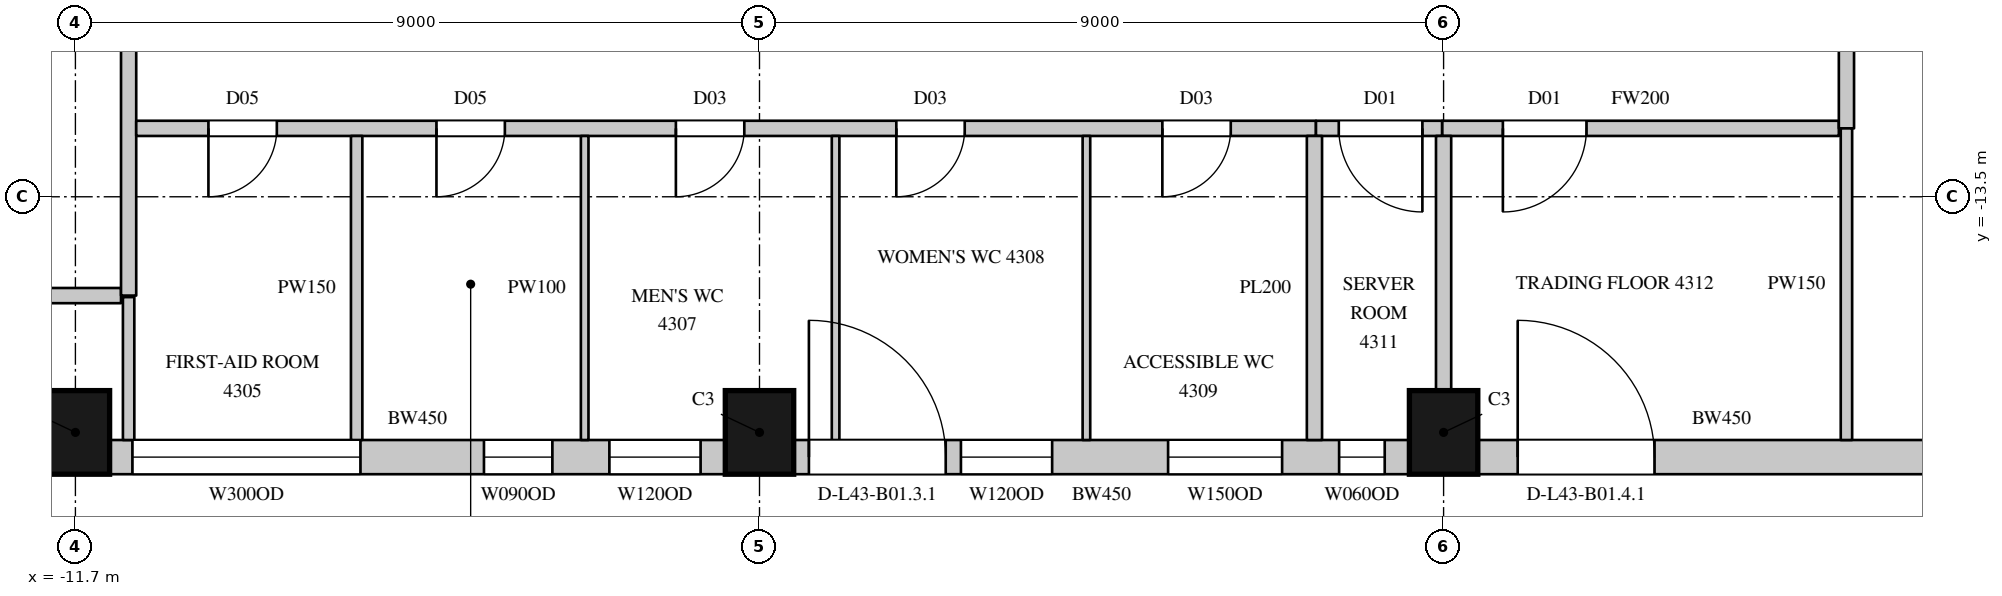
"""IFC4 building model, lengths in metres.
Left out: names, types, materials, properties, quantities, classifications, styles, units other than length and angle.
Written with IfcOpenShell. Run it as: python <this file> out.ifc"""

import sys

from ifc_helpers import new_model, si_unit, direction, frame, frame_2d, origin, origin_2d, place, context, subcontext, project, spatial, rectangle, extrude, element, fill, save


model = new_model("IFC4")
c1 = context("Model", 3, precision=1e-05, world=origin(), true_north=direction((0.0, 1.0)))
c2 = subcontext(c1, "Body", "Model", "MODEL_VIEW")
j1 = project(units=[si_unit("LENGTHUNIT", "METRE"), si_unit("PLANEANGLEUNIT", "RADIAN")], contexts=[c1])
p1 = place(None, origin())
s1 = spatial("IfcSite", under=j1, at=p1, CompositionType="ELEMENT")
p2 = place(p1, origin())
s2 = spatial("IfcBuilding", under=s1, at=p2, CompositionType="ELEMENT")
p3 = place(p2, frame((0.0, 0.0, 197.4)))
s3 = spatial("IfcBuildingStorey", under=s2, at=p3, CompositionType="ELEMENT", Elevation=197.4)
for number, where, z_axis, x_axis in (
    (1, (-11.7, -16.6, 0.0), (0.0, 0.0, 1.0), (1.0, 0.0, 0.0)),
    (2, (-2.7, -16.6, 0.0), (0.0, 0.0, 1.0), (1.0, 0.0, 0.0)),
    (3, (6.3, -16.6, 0.0), (0.0, 0.0, 1.0), (1.0, 0.0, 0.0)),
):
    element("IfcColumn", number, at=place(p3, frame(where, z_axis=z_axis, x_axis=x_axis)), inside=s3, PredefinedType="COLUMN", context=c2, shape_type="SweptSolid", body=[
        extrude(rectangle(XDim=0.9, YDim=1.1, at=origin_2d()), origin(), (0.0, 0.0, 1.0), 4.1),
    ])
p4 = place(p3, frame((-11.25, -16.925, 0.0), z_axis=(0.0, 0.0, 1.0), x_axis=(1.0, 0.0, 0.0)))
e4 = element("IfcWall", 4, at=p4, inside=s3, PredefinedType="SOLIDWALL", context=c2, shape_type="SweptSolid", body=[
    extrude(rectangle(XDim=8.1, YDim=0.45, at=frame_2d((4.05, 0.0))), origin(), (0.0, 0.0, 1.0), 3.8),
])
p5 = place(p4, frame((0.3, 0.0, 1.05)))
e5 = element("IfcOpeningElement", 5, at=p5, cuts=e4, PredefinedType="OPENING", context=c2, shape_type="SweptSolid", body=[
    extrude(rectangle(XDim=3.0, YDim=2.4, at=frame_2d((1.5, 1.2))), frame((0.0, 0.235, 0.0), z_axis=(0.0, -1.0, 0.0), x_axis=(1.0, 0.0, 0.0)), (0.0, 0.0, 1.0), 0.47),
])
p6 = place(p4, frame((4.925, 0.0, 1.05)))
e6 = element("IfcOpeningElement", 6, at=p6, cuts=e4, PredefinedType="OPENING", context=c2, shape_type="SweptSolid", body=[
    extrude(rectangle(XDim=0.9, YDim=2.4, at=frame_2d((0.45, 1.2))), frame((0.0, 0.235, 0.0), z_axis=(0.0, -1.0, 0.0), x_axis=(1.0, 0.0, 0.0)), (0.0, 0.0, 1.0), 0.47),
])
p7 = place(p4, frame((6.575, 0.0, 1.05)))
e7 = element("IfcOpeningElement", 7, at=p7, cuts=e4, PredefinedType="OPENING", context=c2, shape_type="SweptSolid", body=[
    extrude(rectangle(XDim=1.2, YDim=2.4, at=frame_2d((0.6, 1.2))), frame((0.0, 0.235, 0.0), z_axis=(0.0, -1.0, 0.0), x_axis=(1.0, 0.0, 0.0)), (0.0, 0.0, 1.0), 0.47),
])
p8 = place(p3, frame((-2.25, -16.925, 0.0), z_axis=(0.0, 0.0, 1.0), x_axis=(1.0, 0.0, 0.0)))
e8 = element("IfcWall", 8, at=p8, inside=s3, PredefinedType="SOLIDWALL", context=c2, shape_type="SweptSolid", body=[
    extrude(rectangle(XDim=8.1, YDim=0.45, at=frame_2d((4.05, 0.0))), origin(), (0.0, 0.0, 1.0), 3.8),
])
p9 = place(p8, frame((0.2, 0.0, 0.0)))
e9 = element("IfcOpeningElement", 9, at=p9, cuts=e8, PredefinedType="OPENING", context=c2, shape_type="SweptSolid", body=[
    extrude(rectangle(XDim=1.8, YDim=2.4, at=frame_2d((0.9, 1.2))), frame((0.0, 0.235, 0.0), z_axis=(0.0, -1.0, 0.0), x_axis=(1.0, 0.0, 0.0)), (0.0, 0.0, 1.0), 0.47),
])
p10 = place(p8, frame((2.2, 0.0, 1.05)))
e10 = element("IfcOpeningElement", 10, at=p10, cuts=e8, PredefinedType="OPENING", context=c2, shape_type="SweptSolid", body=[
    extrude(rectangle(XDim=1.2, YDim=2.4, at=frame_2d((0.6, 1.2))), frame((0.0, 0.235, 0.0), z_axis=(0.0, -1.0, 0.0), x_axis=(1.0, 0.0, 0.0)), (0.0, 0.0, 1.0), 0.47),
])
p11 = place(p8, frame((4.926, 0.0, 1.05)))
e11 = element("IfcOpeningElement", 11, at=p11, cuts=e8, PredefinedType="OPENING", context=c2, shape_type="SweptSolid", body=[
    extrude(rectangle(XDim=1.5, YDim=2.4, at=frame_2d((0.75, 1.2))), frame((0.0, 0.235, 0.0), z_axis=(0.0, -1.0, 0.0), x_axis=(1.0, 0.0, 0.0)), (0.0, 0.0, 1.0), 0.47),
])
p12 = place(p8, frame((7.176, 0.0, 1.05)))
e12 = element("IfcOpeningElement", 12, at=p12, cuts=e8, PredefinedType="OPENING", context=c2, shape_type="SweptSolid", body=[
    extrude(rectangle(XDim=0.6, YDim=2.4, at=frame_2d((0.3, 1.2))), frame((0.0, 0.235, 0.0), z_axis=(0.0, -1.0, 0.0), x_axis=(1.0, 0.0, 0.0)), (0.0, 0.0, 1.0), 0.47),
])
p13 = place(p3, frame((6.75, -16.925, 0.0), z_axis=(0.0, 0.0, 1.0), x_axis=(1.0, 0.0, 0.0)))
e13 = element("IfcWall", 13, at=p13, inside=s3, PredefinedType="SOLIDWALL", context=c2, shape_type="SweptSolid", body=[
    extrude(rectangle(XDim=6.414, YDim=0.45, at=frame_2d((3.207, 0.0))), origin(), (0.0, 0.0, 1.0), 3.8),
])
p14 = place(p13, frame((0.525, 0.0, 0.0)))
e14 = element("IfcOpeningElement", 14, at=p14, cuts=e13, PredefinedType="OPENING", context=c2, shape_type="SweptSolid", body=[
    extrude(rectangle(XDim=1.8, YDim=2.4, at=frame_2d((0.9, 1.2))), frame((0.0, 0.235, 0.0), z_axis=(0.0, -1.0, 0.0), x_axis=(1.0, 0.0, 0.0)), (0.0, 0.0, 1.0), 0.47),
])
p15 = place(p3, frame((-13.97, -14.8, 0.0), z_axis=(0.0, 0.0, 1.0), x_axis=(1.0, 0.0, 0.0)))
e15 = element("IfcWall", 15, at=p15, inside=s3, PredefinedType="PARTITIONING", context=c2, shape_type="SweptSolid", body=[
    extrude(rectangle(XDim=2.87, YDim=0.2, at=frame_2d((1.435, 0.0))), origin(), (0.0, 0.0, 1.0), 3.8),
])
p16 = place(p3, frame((-11.0, -14.8, 0.0), z_axis=(0.0, 0.0, 1.0), x_axis=(0.0, 1.0, 0.0)))
e16 = element("IfcWall", 16, at=p16, inside=s3, PredefinedType="PARTITIONING", context=c2, shape_type="SweptSolid", body=[
    extrude(rectangle(XDim=29.6, YDim=0.2, at=frame_2d((14.8, 0.0))), origin(), (0.0, 0.0, 1.0), 3.8),
])
p17 = place(p16, frame((14.05, 0.0, 0.0)))
e17 = element("IfcOpeningElement", 17, at=p17, cuts=e16, PredefinedType="OPENING", context=c2, shape_type="SweptSolid", body=[
    extrude(rectangle(XDim=1.5, YDim=2.4, at=frame_2d((0.75, 1.2))), frame((0.0, 0.11, 0.0), z_axis=(0.0, -1.0, 0.0), x_axis=(1.0, 0.0, 0.0)), (0.0, 0.0, 1.0), 0.22),
])
p18 = place(p3, frame((-10.9, -12.6, 0.0), z_axis=(0.0, 0.0, 1.0), x_axis=(1.0, 0.0, 0.0)))
e18 = element("IfcWall", 18, at=p18, inside=s3, PredefinedType="PARTITIONING", context=c2, shape_type="SweptSolid", body=[
    extrude(rectangle(XDim=15.521, YDim=0.2, at=frame_2d((7.76, 0.0))), origin(), (0.0, 0.0, 1.0), 3.8),
])
p19 = place(p18, frame((0.95, 0.0, 0.0)))
e19 = element("IfcOpeningElement", 19, at=p19, cuts=e18, PredefinedType="OPENING", context=c2, shape_type="SweptSolid", body=[
    extrude(rectangle(XDim=0.9, YDim=2.2, at=frame_2d((0.45, 1.1))), frame((0.0, 0.11, 0.0), z_axis=(0.0, -1.0, 0.0), x_axis=(1.0, 0.0, 0.0)), (0.0, 0.0, 1.0), 0.22),
])
p20 = place(p18, frame((3.95, 0.0, 0.0)))
e20 = element("IfcOpeningElement", 20, at=p20, cuts=e18, PredefinedType="OPENING", context=c2, shape_type="SweptSolid", body=[
    extrude(rectangle(XDim=0.9, YDim=2.2, at=frame_2d((0.45, 1.1))), frame((0.0, 0.11, 0.0), z_axis=(0.0, -1.0, 0.0), x_axis=(1.0, 0.0, 0.0)), (0.0, 0.0, 1.0), 0.22),
])
p21 = place(p18, frame((7.1, 0.0, 0.0)))
e21 = element("IfcOpeningElement", 21, at=p21, cuts=e18, PredefinedType="OPENING", context=c2, shape_type="SweptSolid", body=[
    extrude(rectangle(XDim=0.9, YDim=2.2, at=frame_2d((0.45, 1.1))), frame((0.0, 0.11, 0.0), z_axis=(0.0, -1.0, 0.0), x_axis=(1.0, 0.0, 0.0)), (0.0, 0.0, 1.0), 0.22),
])
p22 = place(p18, frame((10.0, 0.0, 0.0)))
e22 = element("IfcOpeningElement", 22, at=p22, cuts=e18, PredefinedType="OPENING", context=c2, shape_type="SweptSolid", body=[
    extrude(rectangle(XDim=0.9, YDim=2.2, at=frame_2d((0.45, 1.1))), frame((0.0, 0.11, 0.0), z_axis=(0.0, -1.0, 0.0), x_axis=(1.0, 0.0, 0.0)), (0.0, 0.0, 1.0), 0.22),
])
p23 = place(p18, frame((13.5, 0.0, 0.0)))
e23 = element("IfcOpeningElement", 23, at=p23, cuts=e18, PredefinedType="OPENING", context=c2, shape_type="SweptSolid", body=[
    extrude(rectangle(XDim=0.9, YDim=2.2, at=frame_2d((0.45, 1.1))), frame((0.0, 0.11, 0.0), z_axis=(0.0, -1.0, 0.0), x_axis=(1.0, 0.0, 0.0)), (0.0, 0.0, 1.0), 0.22),
])
p24 = place(p3, frame((6.28, -12.6, 0.0), z_axis=(0.0, 0.0, 1.0), x_axis=(1.0, 0.0, 0.0)))
e24 = element("IfcWall", 24, at=p24, inside=s3, PredefinedType="PARTITIONING", context=c2, shape_type="SweptSolid", body=[
    extrude(rectangle(XDim=5.22, YDim=0.2, at=frame_2d((2.61, 0.0))), origin(), (0.0, 0.0, 1.0), 3.8),
])
p25 = place(p24, frame((0.8, 0.0, 0.0)))
e25 = element("IfcOpeningElement", 25, at=p25, cuts=e24, PredefinedType="OPENING", context=c2, shape_type="SweptSolid", body=[
    extrude(rectangle(XDim=1.1, YDim=2.4, at=frame_2d((0.55, 1.2))), frame((0.0, 0.11, 0.0), z_axis=(0.0, -1.0, 0.0), x_axis=(1.0, 0.0, 0.0)), (0.0, 0.0, 1.0), 0.22),
])
p26 = place(p3, frame((11.6, -12.6, 0.0), z_axis=(0.0, 0.0, 1.0), x_axis=(0.0, 1.0, 0.0)))
e26 = element("IfcWall", 26, at=p26, inside=s3, PredefinedType="PARTITIONING", context=c2, shape_type="SweptSolid", body=[
    extrude(rectangle(XDim=25.1, YDim=0.2, at=frame_2d((12.55, 0.0))), origin(), (0.0, 0.0, 1.0), 3.8),
])
p27 = place(p26, frame((10.45, 0.0, 0.0)))
e27 = element("IfcOpeningElement", 27, at=p27, cuts=e26, PredefinedType="OPENING", context=c2, shape_type="SweptSolid", body=[
    extrude(rectangle(XDim=1.5, YDim=2.4, at=frame_2d((0.75, 1.2))), frame((0.0, 0.11, 0.0), z_axis=(0.0, -1.0, 0.0), x_axis=(1.0, 0.0, 0.0)), (0.0, 0.0, 1.0), 0.22),
])
p28 = place(p26, frame((3.45, 0.0, 0.0)))
e28 = element("IfcOpeningElement", 28, at=p28, cuts=e26, PredefinedType="OPENING", context=c2, shape_type="SweptSolid", body=[
    extrude(rectangle(XDim=1.1, YDim=2.4, at=frame_2d((0.55, 1.2))), frame((0.0, 0.11, 0.0), z_axis=(0.0, -1.0, 0.0), x_axis=(1.0, 0.0, 0.0)), (0.0, 0.0, 1.0), 0.22),
])
p29 = place(p3, frame((-11.0, -16.7, 0.0), z_axis=(0.0, 0.0, 1.0), x_axis=(0.0, 1.0, 0.0)))
e29 = element("IfcWall", 29, at=p29, inside=s3, PredefinedType="PARTITIONING", context=c2, shape_type="SweptSolid", body=[
    extrude(rectangle(XDim=1.88, YDim=0.15, at=frame_2d((0.94, 0.0))), origin(), (0.0, 0.0, 1.0), 3.8),
])
p30 = place(p3, frame((-8.0, -16.7, 0.0), z_axis=(0.0, 0.0, 1.0), x_axis=(0.0, 1.0, 0.0)))
e30 = element("IfcWall", 30, at=p30, inside=s3, PredefinedType="PARTITIONING", context=c2, shape_type="SweptSolid", body=[
    extrude(rectangle(XDim=4.0, YDim=0.15, at=frame_2d((2.0, 0.0))), origin(), (0.0, 0.0, 1.0), 3.8),
])
p31 = place(p3, frame((11.6, -16.7, 0.0), z_axis=(0.0, 0.0, 1.0), x_axis=(0.0, 1.0, 0.0)))
e31 = element("IfcWall", 31, at=p31, inside=s3, PredefinedType="PARTITIONING", context=c2, shape_type="SweptSolid", body=[
    extrude(rectangle(XDim=4.1, YDim=0.15, at=frame_2d((2.05, 0.0))), origin(), (0.0, 0.0, 1.0), 3.8),
])
p32 = place(p3, frame((4.621, -12.6, 0.0), z_axis=(0.0, 0.0, 1.0), x_axis=(1.0, 0.0, 0.0)))
e32 = element("IfcWall", 32, at=p32, inside=s3, PredefinedType="PARTITIONING", context=c2, shape_type="SweptSolid", body=[
    extrude(rectangle(XDim=1.659, YDim=0.2, at=frame_2d((0.83, 0.0))), origin(), (0.0, 0.0, 1.0), 3.8),
])
p33 = place(p32, frame((0.3, 0.0, 0.0)))
e33 = element("IfcOpeningElement", 33, at=p33, cuts=e32, PredefinedType="OPENING", context=c2, shape_type="SweptSolid", body=[
    extrude(rectangle(XDim=1.1, YDim=2.4, at=frame_2d((0.55, 1.2))), frame((0.0, 0.11, 0.0), z_axis=(0.0, -1.0, 0.0), x_axis=(1.0, 0.0, 0.0)), (0.0, 0.0, 1.0), 0.22),
])
p34 = place(p3, frame((4.601, -16.7, 0.0), z_axis=(0.0, 0.0, 1.0), x_axis=(0.0, 1.0, 0.0)))
e34 = element("IfcWall", 34, at=p34, inside=s3, PredefinedType="PARTITIONING", context=c2, shape_type="SweptSolid", body=[
    extrude(rectangle(XDim=4.0, YDim=0.2, at=frame_2d((2.0, 0.0))), origin(), (0.0, 0.0, 1.0), 3.8),
])
p35 = place(p3, frame((6.3, -16.05, 0.0), z_axis=(0.0, 0.0, 1.0), x_axis=(0.0, 1.0, 0.0)))
e35 = element("IfcWall", 35, at=p35, inside=s3, PredefinedType="PARTITIONING", context=c2, shape_type="SweptSolid", body=[
    extrude(rectangle(XDim=3.35, YDim=0.2, at=frame_2d((1.675, 0.0))), origin(), (0.0, 0.0, 1.0), 3.25),
])
for number, where, z_axis, x_axis in (
    (36, (-5.0, -16.7, 0.0), (0.0, 0.0, 1.0), (0.0, 1.0, 0.0)),
    (37, (-1.699, -16.7, 0.0), (0.0, 0.0, 1.0), (0.0, 1.0, 0.0)),
):
    element("IfcWall", number, at=place(p3, frame(where, z_axis=z_axis, x_axis=x_axis)), inside=s3, PredefinedType="PARTITIONING", context=c2, shape_type="SweptSolid", body=[
        extrude(rectangle(XDim=4.0, YDim=0.1, at=frame_2d((2.0, 0.0))), origin(), (0.0, 0.0, 1.0), 3.8),
    ])
p36 = place(p3, frame((1.601, -16.7, 0.0), z_axis=(0.0, 0.0, 1.0), x_axis=(0.0, 1.0, 0.0)))
e38 = element("IfcWall", 38, at=p36, inside=s3, PredefinedType="PARTITIONING", context=c2, shape_type="SweptSolid", body=[
    extrude(rectangle(XDim=4.0, YDim=0.1, at=frame_2d((2.0, 0.0))), origin(), (0.0, 0.0, 1.0), 3.15),
])
p37 = place(p5, origin())
e39 = element("IfcWindow", 39, at=p37, inside=s3, PartitioningType="SINGLE_PANEL", PredefinedType="WINDOW", context=c2, shape_type="SweptSolid", body=[
    extrude(rectangle(XDim=3.0, YDim=2.4, at=frame_2d((1.5, 1.2))), frame((0.0, 0.135, 0.0), z_axis=(0.0, -1.0, 0.0), x_axis=(1.0, 0.0, 0.0)), (0.0, 0.0, 1.0), 0.06),
])
fill(e5, e39)
p38 = place(p9, origin())
e40 = element("IfcDoor", 40, at=p38, inside=s3, OperationType="SLIDING_TO_LEFT", PredefinedType="DOOR", context=c2, shape_type="SweptSolid", body=[
    extrude(rectangle(XDim=1.8, YDim=2.4, at=frame_2d((0.9, 1.2))), frame((0.0, 0.13, 0.0), z_axis=(0.0, -1.0, 0.0), x_axis=(1.0, 0.0, 0.0)), (0.0, 0.0, 1.0), 0.05),
])
fill(e9, e40)
p39 = place(p10, origin())
e41 = element("IfcWindow", 41, at=p39, inside=s3, PartitioningType="SINGLE_PANEL", PredefinedType="WINDOW", context=c2, shape_type="SweptSolid", body=[
    extrude(rectangle(XDim=1.2, YDim=2.4, at=frame_2d((0.6, 1.2))), frame((0.0, 0.135, 0.0), z_axis=(0.0, -1.0, 0.0), x_axis=(1.0, 0.0, 0.0)), (0.0, 0.0, 1.0), 0.06),
])
fill(e10, e41)
p40 = place(p14, origin())
e42 = element("IfcDoor", 42, at=p40, inside=s3, OperationType="SLIDING_TO_LEFT", PredefinedType="DOOR", context=c2, shape_type="SweptSolid", body=[
    extrude(rectangle(XDim=1.8, YDim=2.4, at=frame_2d((0.9, 1.2))), frame((0.0, 0.13, 0.0), z_axis=(0.0, -1.0, 0.0), x_axis=(1.0, 0.0, 0.0)), (0.0, 0.0, 1.0), 0.05),
])
fill(e14, e42)
p41 = place(p19, origin())
e43 = element("IfcDoor", 43, at=p41, inside=s3, OperationType="SINGLE_SWING_RIGHT", PredefinedType="DOOR", context=c2, shape_type="SweptSolid", body=[
    extrude(rectangle(XDim=0.9, YDim=2.2, at=frame_2d((0.45, 1.1))), frame((0.0, 0.025, 0.0), z_axis=(0.0, -1.0, 0.0), x_axis=(1.0, 0.0, 0.0)), (0.0, 0.0, 1.0), 0.05),
])
fill(e19, e43)
p42 = place(p20, origin())
e44 = element("IfcDoor", 44, at=p42, inside=s3, OperationType="SINGLE_SWING_RIGHT", PredefinedType="DOOR", context=c2, shape_type="SweptSolid", body=[
    extrude(rectangle(XDim=0.9, YDim=2.2, at=frame_2d((0.45, 1.1))), frame((0.0, 0.025, 0.0), z_axis=(0.0, -1.0, 0.0), x_axis=(1.0, 0.0, 0.0)), (0.0, 0.0, 1.0), 0.05),
])
fill(e20, e44)
p43 = place(p21, origin())
e45 = element("IfcDoor", 45, at=p43, inside=s3, OperationType="SINGLE_SWING_RIGHT", PredefinedType="DOOR", context=c2, shape_type="SweptSolid", body=[
    extrude(rectangle(XDim=0.9, YDim=2.2, at=frame_2d((0.45, 1.1))), frame((0.0, 0.025, 0.0), z_axis=(0.0, -1.0, 0.0), x_axis=(1.0, 0.0, 0.0)), (0.0, 0.0, 1.0), 0.05),
])
fill(e21, e45)
p44 = place(p22, origin())
e46 = element("IfcDoor", 46, at=p44, inside=s3, OperationType="SINGLE_SWING_RIGHT", PredefinedType="DOOR", context=c2, shape_type="SweptSolid", body=[
    extrude(rectangle(XDim=0.9, YDim=2.2, at=frame_2d((0.45, 1.1))), frame((0.0, 0.025, 0.0), z_axis=(0.0, -1.0, 0.0), x_axis=(1.0, 0.0, 0.0)), (0.0, 0.0, 1.0), 0.05),
])
fill(e22, e46)
p45 = place(p23, origin())
e47 = element("IfcDoor", 47, at=p45, inside=s3, OperationType="SINGLE_SWING_RIGHT", PredefinedType="DOOR", context=c2, shape_type="SweptSolid", body=[
    extrude(rectangle(XDim=0.9, YDim=2.2, at=frame_2d((0.45, 1.1))), frame((0.0, 0.025, 0.0), z_axis=(0.0, -1.0, 0.0), x_axis=(1.0, 0.0, 0.0)), (0.0, 0.0, 1.0), 0.05),
])
fill(e23, e47)
p46 = place(p33, origin())
e48 = element("IfcDoor", 48, at=p46, inside=s3, OperationType="SINGLE_SWING_LEFT", PredefinedType="DOOR", context=c2, shape_type="SweptSolid", body=[
    extrude(rectangle(XDim=1.1, YDim=2.4, at=frame_2d((0.55, 1.2))), frame((0.0, 0.025, 0.0), z_axis=(0.0, -1.0, 0.0), x_axis=(1.0, 0.0, 0.0)), (0.0, 0.0, 1.0), 0.05),
])
fill(e33, e48)
p47 = place(p25, origin())
e49 = element("IfcDoor", 49, at=p47, inside=s3, OperationType="SINGLE_SWING_RIGHT", PredefinedType="DOOR", context=c2, shape_type="SweptSolid", body=[
    extrude(rectangle(XDim=1.1, YDim=2.4, at=frame_2d((0.55, 1.2))), frame((0.0, 0.025, 0.0), z_axis=(0.0, -1.0, 0.0), x_axis=(1.0, 0.0, 0.0)), (0.0, 0.0, 1.0), 0.05),
])
fill(e25, e49)
p48 = place(p6, origin())
e50 = element("IfcWindow", 50, at=p48, inside=s3, PartitioningType="SINGLE_PANEL", PredefinedType="WINDOW", context=c2, shape_type="SweptSolid", body=[
    extrude(rectangle(XDim=0.9, YDim=2.4, at=frame_2d((0.45, 1.2))), frame((0.0, 0.135, 0.0), z_axis=(0.0, -1.0, 0.0), x_axis=(1.0, 0.0, 0.0)), (0.0, 0.0, 1.0), 0.06),
])
fill(e6, e50)
p49 = place(p7, origin())
e51 = element("IfcWindow", 51, at=p49, inside=s3, PartitioningType="SINGLE_PANEL", PredefinedType="WINDOW", context=c2, shape_type="SweptSolid", body=[
    extrude(rectangle(XDim=1.2, YDim=2.4, at=frame_2d((0.6, 1.2))), frame((0.0, 0.135, 0.0), z_axis=(0.0, -1.0, 0.0), x_axis=(1.0, 0.0, 0.0)), (0.0, 0.0, 1.0), 0.06),
])
fill(e7, e51)
p50 = place(p11, origin())
e52 = element("IfcWindow", 52, at=p50, inside=s3, PartitioningType="SINGLE_PANEL", PredefinedType="WINDOW", context=c2, shape_type="SweptSolid", body=[
    extrude(rectangle(XDim=1.5, YDim=2.4, at=frame_2d((0.75, 1.2))), frame((0.0, 0.135, 0.0), z_axis=(0.0, -1.0, 0.0), x_axis=(1.0, 0.0, 0.0)), (0.0, 0.0, 1.0), 0.06),
])
fill(e11, e52)
p51 = place(p12, origin())
e53 = element("IfcWindow", 53, at=p51, inside=s3, PartitioningType="SINGLE_PANEL", PredefinedType="WINDOW", context=c2, shape_type="SweptSolid", body=[
    extrude(rectangle(XDim=0.6, YDim=2.4, at=frame_2d((0.3, 1.2))), frame((0.0, 0.135, 0.0), z_axis=(0.0, -1.0, 0.0), x_axis=(1.0, 0.0, 0.0)), (0.0, 0.0, 1.0), 0.06),
])
fill(e12, e53)
save(model, sys.argv[1])
